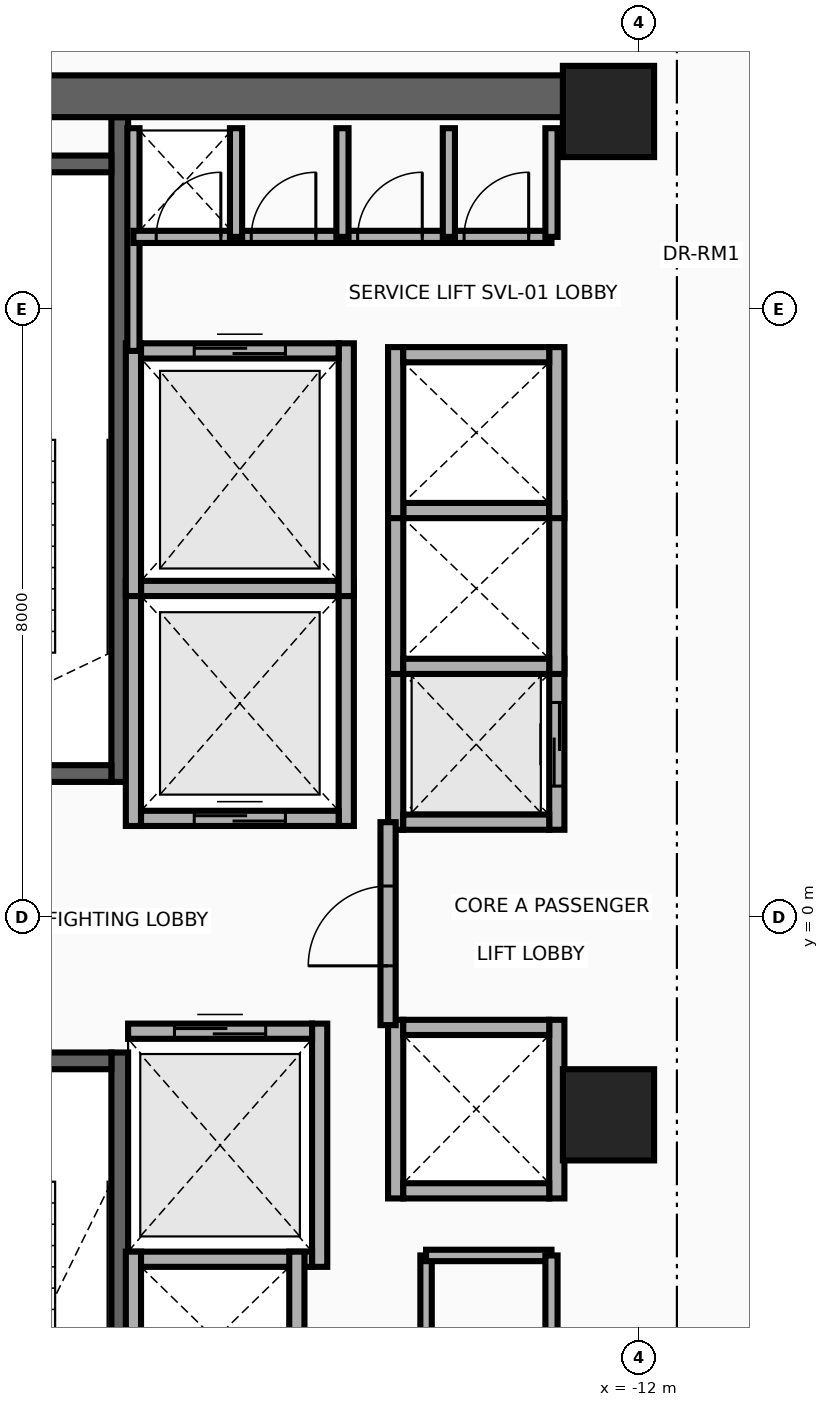
"""IFC4 building model, lengths in metres.
Left out: names, types, materials, properties, quantities, classifications, styles, units other than length and angle.
Written with IfcOpenShell. Run it as: python <this file> out.ifc"""

import sys

from ifc_helpers import new_model, si_unit, direction, frame, frame_2d, origin, origin_2d, place, context, subcontext, project, spatial, rectangle, extrude, source, transform, mapped, element, fill, save


model = new_model("IFC4")
c1 = context("Model", 3, precision=1e-05, world=origin(), true_north=direction((0.0, 1.0)))
c2 = subcontext(c1, "Body", "Model", "MODEL_VIEW")
j1 = project(units=[si_unit("LENGTHUNIT", "METRE"), si_unit("PLANEANGLEUNIT", "RADIAN")], contexts=[c1])
p1 = place(None, origin())
s1 = spatial("IfcSite", under=j1, at=p1, CompositionType="ELEMENT")
p2 = place(p1, origin())
s2 = spatial("IfcBuilding", under=s1, at=p2, CompositionType="ELEMENT")
p3 = place(p2, frame((0.0, 0.0, 153.8)))
s3 = spatial("IfcBuildingStorey", under=s2, at=p3, CompositionType="ELEMENT", Elevation=153.8)
p4 = place(p3, frame((-18.83, 1.78, 0.0), z_axis=(0.0, 0.0, 1.0), x_axis=(0.0, 1.0, 0.0)))
e1 = element("IfcWall", 1, at=p4, inside=s3, PredefinedType="SHEAR", context=c2, shape_type="SweptSolid", body=[
    extrude(rectangle(XDim=8.745, YDim=0.22, at=frame_2d((4.373, 0.0))), origin(), (0.0, 0.0, 1.0), 3.46),
])
p5 = place(p3, frame((-22.05, 1.89, 0.0), z_axis=(0.0, 0.0, 1.0), x_axis=(1.0, 0.0, 0.0)))
e2 = element("IfcWall", 2, at=p5, inside=s3, PredefinedType="SHEAR", context=c2, shape_type="SweptSolid", body=[
    extrude(rectangle(XDim=3.11, YDim=0.22, at=frame_2d((1.555, 0.0))), origin(), (0.0, 0.0, 1.0), 3.46),
])
p6 = place(p5, frame((1.0, 0.0, 0.0)))
e3 = element("IfcOpeningElement", 3, at=p6, cuts=e2, PredefinedType="OPENING", context=c2, shape_type="SweptSolid", body=[
    extrude(rectangle(XDim=1.1, YDim=2.15, at=frame_2d((0.55, 1.075))), frame((0.0, 0.125, 0.0), z_axis=(0.0, -1.0, 0.0), x_axis=(1.0, 0.0, 0.0)), (0.0, 0.0, 1.0), 0.25),
])
p7 = place(p3, frame((-22.05, 9.91, 0.0), z_axis=(0.0, 0.0, 1.0), x_axis=(1.0, 0.0, 0.0)))
e4 = element("IfcWall", 4, at=p7, inside=s3, PredefinedType="SHEAR", context=c2, shape_type="SweptSolid", body=[
    extrude(rectangle(XDim=3.11, YDim=0.22, at=frame_2d((1.555, 0.0))), origin(), (0.0, 0.0, 1.0), 3.46),
])
p8 = place(p3, frame((-18.83, -10.525, 0.0), z_axis=(0.0, 0.0, 1.0), x_axis=(0.0, 1.0, 0.0)))
e5 = element("IfcWall", 5, at=p8, inside=s3, PredefinedType="SHEAR", context=c2, shape_type="SweptSolid", body=[
    extrude(rectangle(XDim=8.745, YDim=0.22, at=frame_2d((4.373, 0.0))), origin(), (0.0, 0.0, 1.0), 3.46),
])
p9 = place(p3, frame((-22.05, -1.89, 0.0), z_axis=(0.0, 0.0, 1.0), x_axis=(1.0, 0.0, 0.0)))
e6 = element("IfcWall", 6, at=p9, inside=s3, PredefinedType="SHEAR", context=c2, shape_type="SweptSolid", body=[
    extrude(rectangle(XDim=3.11, YDim=0.22, at=frame_2d((1.555, 0.0))), origin(), (0.0, 0.0, 1.0), 3.46),
])
p10 = place(p9, frame((1.0, 0.0, 0.0)))
e7 = element("IfcOpeningElement", 7, at=p10, cuts=e6, PredefinedType="OPENING", context=c2, shape_type="SweptSolid", body=[
    extrude(rectangle(XDim=1.1, YDim=2.15, at=frame_2d((0.55, 1.075))), frame((0.0, 0.125, 0.0), z_axis=(0.0, -1.0, 0.0), x_axis=(1.0, 0.0, 0.0)), (0.0, 0.0, 1.0), 0.25),
])
p11 = place(p3, frame((-22.65, 10.8, 0.0), z_axis=(0.0, 0.0, 1.0), x_axis=(1.0, 0.0, 0.0)))
e8 = element("IfcWall", 8, at=p11, inside=s3, PredefinedType="SHEAR", context=c2, shape_type="SweptSolid", body=[
    extrude(rectangle(XDim=10.25, YDim=0.55, at=frame_2d((5.125, 0.0))), origin(), (0.0, 0.0, 1.0), 3.46),
])
m1 = source(origin(), c2, "Body", "SweptSolid", [
    extrude(rectangle(XDim=1.2, YDim=1.2, at=origin_2d()), origin(), (0.0, 0.0, 1.0), 3.7),
])
for number, where, z_axis, x_axis in (
    (9, (-12.4, -2.6, 0.0), (0.0, 0.0, 1.0), (1.0, 0.0, 0.0)),
    (10, (-12.4, 10.6, 0.0), (0.0, 0.0, 1.0), (1.0, 0.0, 0.0)),
):
    element("IfcColumn", number, at=place(p3, frame(where, z_axis=z_axis, x_axis=x_axis)), inside=s3, PredefinedType="COLUMN", context=c2, shape_type="MappedRepresentation", body=[
        mapped(m1, transform((0.0, 0.0, 0.0), x_axis=(1.0, 0.0, 0.0), y_axis=(0.0, 1.0, 0.0), z_axis=(0.0, 0.0, 1.0), scale=1.0)),
    ])
for number, where, z_axis, x_axis in (
    (11, (-18.65, 1.2, 0.0), (0.0, 0.0, 1.0), (0.0, 1.0, 0.0)),
    (12, (-15.85, 1.2, 0.0), (0.0, 0.0, 1.0), (0.0, 1.0, 0.0)),
):
    element("IfcWall", number, at=place(p3, frame(where, z_axis=z_axis, x_axis=x_axis)), inside=s3, PredefinedType="MOVABLE", context=c2, shape_type="SweptSolid", body=[
        extrude(rectangle(XDim=3.225, YDim=0.2, at=frame_2d((1.613, 0.0))), origin(), (0.0, 0.0, 1.0), 3.46),
    ])
p12 = place(p3, frame((-18.55, 1.3, 0.0), z_axis=(0.0, 0.0, 1.0), x_axis=(1.0, 0.0, 0.0)))
e13 = element("IfcWall", 13, at=p12, inside=s3, PredefinedType="MOVABLE", context=c2, shape_type="SweptSolid", body=[
    extrude(rectangle(XDim=2.6, YDim=0.2, at=frame_2d((1.3, 0.0))), origin(), (0.0, 0.0, 1.0), 3.46),
])
p13 = place(p12, frame((0.7, 0.0, 0.0)))
e14 = element("IfcOpeningElement", 14, at=p13, cuts=e13, PredefinedType="OPENING", context=c2, shape_type="SweptSolid", body=[
    extrude(rectangle(XDim=1.2, YDim=2.1, at=frame_2d((0.6, 1.05))), frame((0.0, 0.115, 0.0), z_axis=(0.0, -1.0, 0.0), x_axis=(1.0, 0.0, 0.0)), (0.0, 0.0, 1.0), 0.23),
])
p14 = place(p3, frame((-18.55, 4.325, 0.0), z_axis=(0.0, 0.0, 1.0), x_axis=(1.0, 0.0, 0.0)))
e15 = element("IfcWall", 15, at=p14, inside=s3, PredefinedType="MOVABLE", context=c2, shape_type="SweptSolid", body=[
    extrude(rectangle(XDim=2.6, YDim=0.2, at=frame_2d((1.3, 0.0))), origin(), (0.0, 0.0, 1.0), 3.46),
])
p15 = place(p3, frame((-16.2, -4.6, 0.0), z_axis=(0.0, 0.0, 1.0), x_axis=(0.0, 1.0, 0.0)))
e16 = element("IfcWall", 16, at=p15, inside=s3, PredefinedType="MOVABLE", context=c2, shape_type="SweptSolid", body=[
    extrude(rectangle(XDim=3.2, YDim=0.2, at=frame_2d((1.6, 0.0))), origin(), (0.0, 0.0, 1.0), 3.46),
])
p16 = place(p3, frame((-18.72, -4.5, 0.0), z_axis=(0.0, 0.0, 1.0), x_axis=(1.0, 0.0, 0.0)))
e17 = element("IfcWall", 17, at=p16, inside=s3, PredefinedType="MOVABLE", context=c2, shape_type="SweptSolid", body=[
    extrude(rectangle(XDim=2.42, YDim=0.2, at=frame_2d((1.21, 0.0))), origin(), (0.0, 0.0, 1.0), 3.46),
])
p17 = place(p3, frame((-18.72, -1.5, 0.0), z_axis=(0.0, 0.0, 1.0), x_axis=(1.0, 0.0, 0.0)))
e18 = element("IfcWall", 18, at=p17, inside=s3, PredefinedType="MOVABLE", context=c2, shape_type="SweptSolid", body=[
    extrude(rectangle(XDim=2.42, YDim=0.2, at=frame_2d((1.21, 0.0))), origin(), (0.0, 0.0, 1.0), 3.46),
])
p18 = place(p17, frame((0.61, 0.0, 0.0)))
e19 = element("IfcOpeningElement", 19, at=p18, cuts=e18, PredefinedType="OPENING", context=c2, shape_type="SweptSolid", body=[
    extrude(rectangle(XDim=1.2, YDim=2.1, at=frame_2d((0.6, 1.05))), frame((0.0, 0.115, 0.0), z_axis=(0.0, -1.0, 0.0), x_axis=(1.0, 0.0, 0.0)), (0.0, 0.0, 1.0), 0.23),
])
for number, where, z_axis, x_axis in (
    (20, (-18.65, 4.225, 0.0), (0.0, 0.0, 1.0), (0.0, 1.0, 0.0)),
    (21, (-15.85, 4.225, 0.0), (0.0, 0.0, 1.0), (0.0, 1.0, 0.0)),
):
    element("IfcWall", number, at=place(p3, frame(where, z_axis=z_axis, x_axis=x_axis)), inside=s3, PredefinedType="MOVABLE", context=c2, shape_type="SweptSolid", body=[
        extrude(rectangle(XDim=3.325, YDim=0.2, at=frame_2d((1.663, 0.0))), origin(), (0.0, 0.0, 1.0), 3.46),
    ])
p19 = place(p3, frame((-18.55, 7.45, 0.0), z_axis=(0.0, 0.0, 1.0), x_axis=(1.0, 0.0, 0.0)))
e22 = element("IfcWall", 22, at=p19, inside=s3, PredefinedType="MOVABLE", context=c2, shape_type="SweptSolid", body=[
    extrude(rectangle(XDim=2.6, YDim=0.2, at=frame_2d((1.3, 0.0))), origin(), (0.0, 0.0, 1.0), 3.46),
])
p20 = place(p19, frame((0.7, 0.0, 0.0)))
e23 = element("IfcOpeningElement", 23, at=p20, cuts=e22, PredefinedType="OPENING", context=c2, shape_type="SweptSolid", body=[
    extrude(rectangle(XDim=1.2, YDim=2.1, at=frame_2d((0.6, 1.05))), frame((0.0, 0.115, 0.0), z_axis=(0.0, -1.0, 0.0), x_axis=(1.0, 0.0, 0.0)), (0.0, 0.0, 1.0), 0.23),
])
p21 = place(p3, frame((-15.2, 1.15, 0.0), z_axis=(0.0, 0.0, 1.0), x_axis=(0.0, 1.0, 0.0)))
e24 = element("IfcWall", 24, at=p21, inside=s3, PredefinedType="MOVABLE", context=c2, shape_type="SweptSolid", body=[
    extrude(rectangle(XDim=2.25, YDim=0.2, at=frame_2d((1.125, 0.0))), origin(), (0.0, 0.0, 1.0), 3.46),
])
p22 = place(p3, frame((-13.08, 1.15, 0.0), z_axis=(0.0, 0.0, 1.0), x_axis=(0.0, 1.0, 0.0)))
e25 = element("IfcWall", 25, at=p22, inside=s3, PredefinedType="MOVABLE", context=c2, shape_type="SweptSolid", body=[
    extrude(rectangle(XDim=2.25, YDim=0.2, at=frame_2d((1.125, 0.0))), origin(), (0.0, 0.0, 1.0), 3.46),
])
p23 = place(p22, frame((0.575, 0.0, 0.0)))
e26 = element("IfcOpeningElement", 26, at=p23, cuts=e25, PredefinedType="OPENING", context=c2, shape_type="SweptSolid", body=[
    extrude(rectangle(XDim=1.1, YDim=2.1, at=frame_2d((0.55, 1.05))), frame((0.0, 0.115, 0.0), z_axis=(0.0, -1.0, 0.0), x_axis=(1.0, 0.0, 0.0)), (0.0, 0.0, 1.0), 0.23),
])
p24 = place(p3, frame((-15.1, 1.25, 0.0), z_axis=(0.0, 0.0, 1.0), x_axis=(1.0, 0.0, 0.0)))
e27 = element("IfcWall", 27, at=p24, inside=s3, PredefinedType="MOVABLE", context=c2, shape_type="SweptSolid", body=[
    extrude(rectangle(XDim=1.92, YDim=0.2, at=frame_2d((0.96, 0.0))), origin(), (0.0, 0.0, 1.0), 3.46),
])
for number, where, z_axis, x_axis in (
    (28, (-15.2, 3.2, 0.0), (0.0, 0.0, 1.0), (0.0, 1.0, 0.0)),
    (29, (-13.08, 3.2, 0.0), (0.0, 0.0, 1.0), (0.0, 1.0, 0.0)),
):
    element("IfcWall", number, at=place(p3, frame(where, z_axis=z_axis, x_axis=x_axis)), inside=s3, PredefinedType="MOVABLE", context=c2, shape_type="SweptSolid", body=[
        extrude(rectangle(XDim=2.25, YDim=0.2, at=frame_2d((1.125, 0.0))), origin(), (0.0, 0.0, 1.0), 3.46),
    ])
for number, where, z_axis, x_axis in (
    (30, (-15.1, 3.3, 0.0), (0.0, 0.0, 1.0), (1.0, 0.0, 0.0)),
    (31, (-15.1, 5.35, 0.0), (0.0, 0.0, 1.0), (1.0, 0.0, 0.0)),
):
    element("IfcWall", number, at=place(p3, frame(where, z_axis=z_axis, x_axis=x_axis)), inside=s3, PredefinedType="MOVABLE", context=c2, shape_type="SweptSolid", body=[
        extrude(rectangle(XDim=1.92, YDim=0.2, at=frame_2d((0.96, 0.0))), origin(), (0.0, 0.0, 1.0), 3.46),
    ])
for number, where, z_axis, x_axis in (
    (32, (-15.2, 5.25, 0.0), (0.0, 0.0, 1.0), (0.0, 1.0, 0.0)),
    (33, (-13.08, 5.25, 0.0), (0.0, 0.0, 1.0), (0.0, 1.0, 0.0)),
):
    element("IfcWall", number, at=place(p3, frame(where, z_axis=z_axis, x_axis=x_axis)), inside=s3, PredefinedType="MOVABLE", context=c2, shape_type="SweptSolid", body=[
        extrude(rectangle(XDim=2.25, YDim=0.2, at=frame_2d((1.125, 0.0))), origin(), (0.0, 0.0, 1.0), 3.46),
    ])
p25 = place(p3, frame((-15.1, 7.4, 0.0), z_axis=(0.0, 0.0, 1.0), x_axis=(1.0, 0.0, 0.0)))
e34 = element("IfcWall", 34, at=p25, inside=s3, PredefinedType="MOVABLE", context=c2, shape_type="SweptSolid", body=[
    extrude(rectangle(XDim=1.92, YDim=0.2, at=frame_2d((0.96, 0.0))), origin(), (0.0, 0.0, 1.0), 3.46),
])
for number, where, z_axis, x_axis in (
    (35, (-18.65, -6.7, 0.0), (0.0, 0.0, 1.0), (0.0, 1.0, 0.0)),
    (36, (-16.5, -6.7, 0.0), (0.0, 0.0, 1.0), (0.0, 1.0, 0.0)),
):
    element("IfcWall", number, at=place(p3, frame(where, z_axis=z_axis, x_axis=x_axis)), inside=s3, PredefinedType="MOVABLE", context=c2, shape_type="SweptSolid", body=[
        extrude(rectangle(XDim=2.3, YDim=0.2, at=frame_2d((1.15, 0.0))), origin(), (0.0, 0.0, 1.0), 3.46),
    ])
for number, where, z_axis, x_axis in (
    (37, (-15.2, -3.7, 0.0), (0.0, 0.0, 1.0), (0.0, 1.0, 0.0)),
    (38, (-13.08, -3.7, 0.0), (0.0, 0.0, 1.0), (0.0, 1.0, 0.0)),
):
    element("IfcWall", number, at=place(p3, frame(where, z_axis=z_axis, x_axis=x_axis)), inside=s3, PredefinedType="MOVABLE", context=c2, shape_type="SweptSolid", body=[
        extrude(rectangle(XDim=2.35, YDim=0.2, at=frame_2d((1.175, 0.0))), origin(), (0.0, 0.0, 1.0), 3.46),
    ])
for number, where, z_axis, x_axis in (
    (39, (-15.1, -3.6, 0.0), (0.0, 0.0, 1.0), (1.0, 0.0, 0.0)),
    (40, (-15.1, -1.45, 0.0), (0.0, 0.0, 1.0), (1.0, 0.0, 0.0)),
):
    element("IfcWall", number, at=place(p3, frame(where, z_axis=z_axis, x_axis=x_axis)), inside=s3, PredefinedType="MOVABLE", context=c2, shape_type="SweptSolid", body=[
        extrude(rectangle(XDim=1.92, YDim=0.2, at=frame_2d((0.96, 0.0))), origin(), (0.0, 0.0, 1.0), 3.46),
    ])
p26 = place(p3, frame((-15.3, -1.42, 0.0), z_axis=(0.0, 0.0, 1.0), x_axis=(0.0, 1.0, 0.0)))
e41 = element("IfcWall", 41, at=p26, inside=s3, PredefinedType="PARTITIONING", context=c2, shape_type="SweptSolid", body=[
    extrude(rectangle(XDim=2.67, YDim=0.2, at=frame_2d((1.335, 0.0))), origin(), (0.0, 0.0, 1.0), 3.46),
])
p27 = place(p26, frame((0.78, 0.0, 0.0)))
e42 = element("IfcOpeningElement", 42, at=p27, cuts=e41, PredefinedType="OPENING", context=c2, shape_type="SweptSolid", body=[
    extrude(rectangle(XDim=1.05, YDim=2.15, at=frame_2d((0.525, 1.075))), frame((0.0, 0.115, 0.0), z_axis=(0.0, -1.0, 0.0), x_axis=(1.0, 0.0, 0.0)), (0.0, 0.0, 1.0), 0.23),
])
p28 = place(p3, frame((-18.65, 7.45, 0.0), z_axis=(0.0, 0.0, 1.0), x_axis=(0.0, 1.0, 0.0)))
e43 = element("IfcWall", 43, at=p28, inside=s3, PredefinedType="PARTITIONING", context=c2, shape_type="SweptSolid", body=[
    extrude(rectangle(XDim=2.93, YDim=0.16, at=frame_2d((1.465, 0.0))), origin(), (0.0, 0.0, 1.0), 3.46),
])
p29 = place(p3, frame((-18.65, 8.95, 0.0), z_axis=(0.0, 0.0, 1.0), x_axis=(1.0, 0.0, 0.0)))
e44 = element("IfcWall", 44, at=p29, inside=s3, PredefinedType="PARTITIONING", context=c2, shape_type="SweptSolid", body=[
    extrude(rectangle(XDim=5.5, YDim=0.16, at=frame_2d((2.75, 0.0))), origin(), (0.0, 0.0, 1.0), 3.46),
])
p30 = place(p29, frame((0.3, 0.0, 0.0)))
e45 = element("IfcOpeningElement", 45, at=p30, cuts=e44, PredefinedType="OPENING", context=c2, shape_type="SweptSolid", body=[
    extrude(rectangle(XDim=0.85, YDim=2.05, at=frame_2d((0.425, 1.025))), frame((0.0, 0.095, 0.0), z_axis=(0.0, -1.0, 0.0), x_axis=(1.0, 0.0, 0.0)), (0.0, 0.0, 1.0), 0.19),
])
p31 = place(p29, frame((1.55, 0.0, 0.0)))
e46 = element("IfcOpeningElement", 46, at=p31, cuts=e44, PredefinedType="OPENING", context=c2, shape_type="SweptSolid", body=[
    extrude(rectangle(XDim=0.85, YDim=2.05, at=frame_2d((0.425, 1.025))), frame((0.0, 0.095, 0.0), z_axis=(0.0, -1.0, 0.0), x_axis=(1.0, 0.0, 0.0)), (0.0, 0.0, 1.0), 0.19),
])
p32 = place(p29, frame((2.95, 0.0, 0.0)))
e47 = element("IfcOpeningElement", 47, at=p32, cuts=e44, PredefinedType="OPENING", context=c2, shape_type="SweptSolid", body=[
    extrude(rectangle(XDim=0.85, YDim=2.05, at=frame_2d((0.425, 1.025))), frame((0.0, 0.095, 0.0), z_axis=(0.0, -1.0, 0.0), x_axis=(1.0, 0.0, 0.0)), (0.0, 0.0, 1.0), 0.19),
])
p33 = place(p29, frame((4.35, 0.0, 0.0)))
e48 = element("IfcOpeningElement", 48, at=p33, cuts=e44, PredefinedType="OPENING", context=c2, shape_type="SweptSolid", body=[
    extrude(rectangle(XDim=0.85, YDim=2.05, at=frame_2d((0.425, 1.025))), frame((0.0, 0.095, 0.0), z_axis=(0.0, -1.0, 0.0), x_axis=(1.0, 0.0, 0.0)), (0.0, 0.0, 1.0), 0.19),
])
for number, where, z_axis, x_axis in (
    (49, (-13.15, 8.95, 0.0), (0.0, 0.0, 1.0), (0.0, 1.0, 0.0)),
    (50, (-17.3, 8.95, 0.0), (0.0, 0.0, 1.0), (0.0, 1.0, 0.0)),
    (51, (-15.9, 8.95, 0.0), (0.0, 0.0, 1.0), (0.0, 1.0, 0.0)),
    (52, (-14.5, 8.95, 0.0), (0.0, 0.0, 1.0), (0.0, 1.0, 0.0)),
):
    element("IfcWall", number, at=place(p3, frame(where, z_axis=z_axis, x_axis=x_axis)), inside=s3, PredefinedType="PARTITIONING", context=c2, shape_type="SweptSolid", body=[
        extrude(rectangle(XDim=1.43, YDim=0.16, at=frame_2d((0.715, 0.0))), origin(), (0.0, 0.0, 1.0), 3.46),
    ])
p34 = place(p3, frame((-14.8, -6.58, 0.0), z_axis=(0.0, 0.0, 1.0), x_axis=(0.0, 1.0, 0.0)))
e53 = element("IfcWall", 53, at=p34, inside=s3, PredefinedType="PARTITIONING", context=c2, shape_type="SweptSolid", body=[
    extrude(rectangle(XDim=2.13, YDim=0.15, at=frame_2d((1.065, 0.0))), origin(), (0.0, 0.0, 1.0), 3.46),
])
p35 = place(p3, frame((-14.8, -4.45, 0.0), z_axis=(0.0, 0.0, 1.0), x_axis=(1.0, 0.0, 0.0)))
e54 = element("IfcWall", 54, at=p35, inside=s3, PredefinedType="PARTITIONING", context=c2, shape_type="SweptSolid", body=[
    extrude(rectangle(XDim=1.65, YDim=0.15, at=frame_2d((0.825, 0.0))), origin(), (0.0, 0.0, 1.0), 3.46),
])
p36 = place(p3, frame((-13.15, -6.58, 0.0), z_axis=(0.0, 0.0, 1.0), x_axis=(0.0, 1.0, 0.0)))
e55 = element("IfcWall", 55, at=p36, inside=s3, PredefinedType="PARTITIONING", context=c2, shape_type="SweptSolid", body=[
    extrude(rectangle(XDim=2.13, YDim=0.16, at=frame_2d((1.065, 0.0))), origin(), (0.0, 0.0, 1.0), 3.46),
])
p37 = place(p13, origin())
e56 = element("IfcDoor", 56, at=p37, inside=s3, OperationType="DOUBLE_DOOR_SLIDING", PredefinedType="DOOR", context=c2, shape_type="SweptSolid", body=[
    extrude(rectangle(XDim=1.2, YDim=2.1, at=frame_2d((0.6, 1.05))), frame((0.0, 0.025, 0.0), z_axis=(0.0, -1.0, 0.0), x_axis=(1.0, 0.0, 0.0)), (0.0, 0.0, 1.0), 0.05),
])
fill(e14, e56)
p38 = place(p18, origin())
e57 = element("IfcDoor", 57, at=p38, inside=s3, OperationType="DOUBLE_DOOR_SLIDING", PredefinedType="DOOR", context=c2, shape_type="SweptSolid", body=[
    extrude(rectangle(XDim=1.2, YDim=2.1, at=frame_2d((0.6, 1.05))), frame((0.0, 0.025, 0.0), z_axis=(0.0, -1.0, 0.0), x_axis=(1.0, 0.0, 0.0)), (0.0, 0.0, 1.0), 0.05),
])
fill(e19, e57)
p39 = place(p20, origin())
e58 = element("IfcDoor", 58, at=p39, inside=s3, OperationType="DOUBLE_DOOR_SLIDING", PredefinedType="DOOR", context=c2, shape_type="SweptSolid", body=[
    extrude(rectangle(XDim=1.2, YDim=2.1, at=frame_2d((0.6, 1.05))), frame((0.0, 0.025, 0.0), z_axis=(0.0, -1.0, 0.0), x_axis=(1.0, 0.0, 0.0)), (0.0, 0.0, 1.0), 0.05),
])
fill(e23, e58)
p40 = place(p23, origin())
e59 = element("IfcDoor", 59, at=p40, inside=s3, OperationType="DOUBLE_DOOR_SLIDING", PredefinedType="DOOR", context=c2, shape_type="SweptSolid", body=[
    extrude(rectangle(XDim=1.1, YDim=2.1, at=frame_2d((0.55, 1.05))), frame((0.0, 0.025, 0.0), z_axis=(0.0, -1.0, 0.0), x_axis=(1.0, 0.0, 0.0)), (0.0, 0.0, 1.0), 0.05),
])
fill(e26, e59)
p41 = place(p27, origin())
e60 = element("IfcDoor", 60, at=p41, inside=s3, OperationType="SINGLE_SWING_RIGHT", PredefinedType="DOOR", context=c2, shape_type="SweptSolid", body=[
    extrude(rectangle(XDim=1.05, YDim=2.15, at=frame_2d((0.525, 1.075))), frame((0.0, 0.025, 0.0), z_axis=(0.0, -1.0, 0.0), x_axis=(1.0, 0.0, 0.0)), (0.0, 0.0, 1.0), 0.05),
])
fill(e42, e60)
p42 = place(p30, origin())
e61 = element("IfcDoor", 61, at=p42, inside=s3, OperationType="SINGLE_SWING_LEFT", PredefinedType="DOOR", context=c2, shape_type="SweptSolid", body=[
    extrude(rectangle(XDim=0.85, YDim=2.05, at=frame_2d((0.425, 1.025))), frame((0.0, 0.025, 0.0), z_axis=(0.0, -1.0, 0.0), x_axis=(1.0, 0.0, 0.0)), (0.0, 0.0, 1.0), 0.05),
])
fill(e45, e61)
p43 = place(p31, origin())
e62 = element("IfcDoor", 62, at=p43, inside=s3, OperationType="SINGLE_SWING_RIGHT", PredefinedType="DOOR", context=c2, shape_type="SweptSolid", body=[
    extrude(rectangle(XDim=0.85, YDim=2.05, at=frame_2d((0.425, 1.025))), frame((0.0, 0.025, 0.0), z_axis=(0.0, -1.0, 0.0), x_axis=(1.0, 0.0, 0.0)), (0.0, 0.0, 1.0), 0.05),
])
fill(e46, e62)
p44 = place(p32, origin())
e63 = element("IfcDoor", 63, at=p44, inside=s3, OperationType="SINGLE_SWING_LEFT", PredefinedType="DOOR", context=c2, shape_type="SweptSolid", body=[
    extrude(rectangle(XDim=0.85, YDim=2.05, at=frame_2d((0.425, 1.025))), frame((0.0, 0.025, 0.0), z_axis=(0.0, -1.0, 0.0), x_axis=(1.0, 0.0, 0.0)), (0.0, 0.0, 1.0), 0.05),
])
fill(e47, e63)
p45 = place(p33, origin())
e64 = element("IfcDoor", 64, at=p45, inside=s3, OperationType="SINGLE_SWING_RIGHT", PredefinedType="DOOR", context=c2, shape_type="SweptSolid", body=[
    extrude(rectangle(XDim=0.85, YDim=2.05, at=frame_2d((0.425, 1.025))), frame((0.0, 0.025, 0.0), z_axis=(0.0, -1.0, 0.0), x_axis=(1.0, 0.0, 0.0)), (0.0, 0.0, 1.0), 0.05),
])
fill(e48, e64)
save(model, sys.argv[1])
